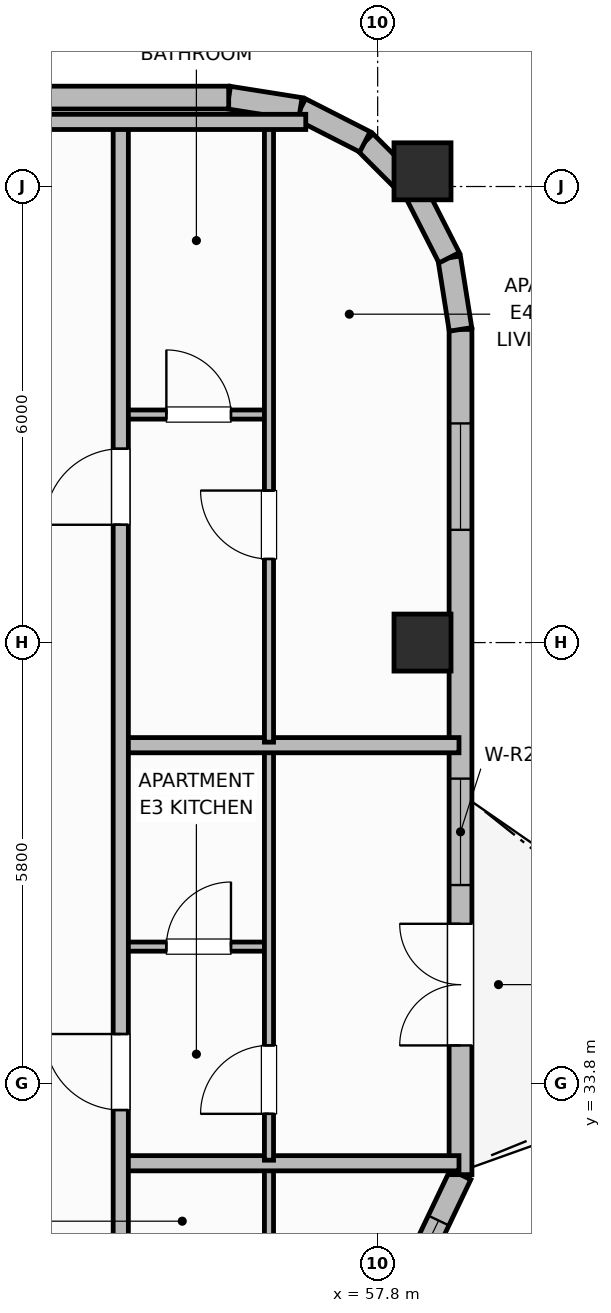
"""IFC4 building model, lengths in metres.
Left out: names, types, materials, properties, quantities, classifications, styles, units other than length and angle.
Written with IfcOpenShell. Run it as: python <this file> out.ifc"""

import sys

from ifc_helpers import new_model, si_unit, direction, frame, frame_2d, origin, origin_2d, place, context, subcontext, project, spatial, rectangle, extrude, element, fill, save


model = new_model("IFC4")
c1 = context("Model", 3, precision=1e-05, world=origin(), true_north=direction((0.0, 1.0)))
c2 = subcontext(c1, "Body", "Model", "MODEL_VIEW")
j1 = project(units=[si_unit("LENGTHUNIT", "METRE"), si_unit("PLANEANGLEUNIT", "RADIAN")], contexts=[c1])
p1 = place(None, origin())
s1 = spatial("IfcSite", under=j1, at=p1, CompositionType="ELEMENT")
p2 = place(p1, origin())
s2 = spatial("IfcBuilding", under=s1, at=p2, CompositionType="ELEMENT")
p3 = place(p2, frame((0.0, 0.0, 278.7)))
s3 = spatial("IfcBuildingStorey", under=s2, at=p3, CompositionType="ELEMENT", Elevation=278.7)
for number, where, z_axis, x_axis in (
    (1, (58.39, 39.6, 0.0), (0.0, 0.0, 1.0), (1.0, 0.0, 0.0)),
    (2, (58.39, 45.8, 0.0), (0.0, 0.0, 1.0), (1.0, 0.0, 0.0)),
):
    element("IfcColumn", number, at=place(p3, frame(where, z_axis=z_axis, x_axis=x_axis)), inside=s3, PredefinedType="COLUMN", context=c2, shape_type="SweptSolid", body=[
        extrude(rectangle(XDim=0.75, YDim=0.75, at=origin_2d()), origin(), (0.0, 0.0, 1.0), 3.7),
    ])
p4 = place(p3, frame((57.84, 30.4, 0.0), z_axis=(0.0, 0.0, 1.0), x_axis=(0.430633186234, 0.902527040544, 0.0)))
e3 = element("IfcWall", 3, at=p4, inside=s3, PredefinedType="SOLIDWALL", context=c2, shape_type="SweptSolid", body=[
    extrude(rectangle(XDim=2.438, YDim=0.3, at=frame_2d((1.219, 0.0))), origin(), (0.0, 0.0, 1.0), 2.73),
])
p5 = place(p4, frame((0.669, 0.0, 0.92)))
e4 = element("IfcOpeningElement", 4, at=p5, cuts=e3, PredefinedType="OPENING", context=c2, shape_type="SweptSolid", body=[
    extrude(rectangle(XDim=1.1, YDim=1.65, at=frame_2d((0.55, 0.825))), frame((0.0, 0.16, 0.0), z_axis=(0.0, -1.0, 0.0), x_axis=(1.0, 0.0, 0.0)), (0.0, 0.0, 1.0), 0.32),
])
p6 = place(p3, frame((58.89, 32.6, 0.0), z_axis=(0.0, 0.0, 1.0), x_axis=(0.0, 1.0, 0.0)))
e5 = element("IfcWall", 5, at=p6, inside=s3, PredefinedType="SOLIDWALL", context=c2, shape_type="SweptSolid", body=[
    extrude(rectangle(XDim=11.12, YDim=0.3, at=frame_2d((5.56, 0.0))), origin(), (0.0, 0.0, 1.0), 2.73),
])
p7 = place(p6, frame((1.7, 0.0, 0.0)))
e6 = element("IfcOpeningElement", 6, at=p7, cuts=e5, PredefinedType="OPENING", context=c2, shape_type="SweptSolid", body=[
    extrude(rectangle(XDim=1.6, YDim=2.1, at=frame_2d((0.8, 1.05))), frame((0.0, 0.16, 0.0), z_axis=(0.0, -1.0, 0.0), x_axis=(1.0, 0.0, 0.0)), (0.0, 0.0, 1.0), 0.32),
])
p8 = place(p6, frame((3.81, 0.0, 0.76)))
e7 = element("IfcOpeningElement", 7, at=p8, cuts=e5, PredefinedType="OPENING", context=c2, shape_type="SweptSolid", body=[
    extrude(rectangle(XDim=1.4, YDim=1.85, at=frame_2d((0.7, 0.925))), frame((0.0, 0.16, 0.0), z_axis=(0.0, -1.0, 0.0), x_axis=(1.0, 0.0, 0.0)), (0.0, 0.0, 1.0), 0.32),
])
p9 = place(p6, frame((8.483, 0.0, 0.76)))
e8 = element("IfcOpeningElement", 8, at=p9, cuts=e5, PredefinedType="OPENING", context=c2, shape_type="SweptSolid", body=[
    extrude(rectangle(XDim=1.4, YDim=1.85, at=frame_2d((0.7, 0.925))), frame((0.0, 0.16, 0.0), z_axis=(0.0, -1.0, 0.0), x_axis=(1.0, 0.0, 0.0)), (0.0, 0.0, 1.0), 0.32),
])
p10 = place(p3, frame((58.89, 43.72, 0.0), z_axis=(0.0, 0.0, 1.0), x_axis=(-0.156304114255, 0.987708977314, 0.0)))
e9 = element("IfcWall", 9, at=p10, inside=s3, PredefinedType="SOLIDWALL", context=c2, shape_type="SweptSolid", body=[
    extrude(rectangle(XDim=0.954, YDim=0.3, at=frame_2d((0.477, 0.0))), origin(), (0.0, 0.0, 1.0), 2.73),
])
p11 = place(p3, frame((58.741, 44.663, 0.0), z_axis=(0.0, 0.0, 1.0), x_axis=(-0.45395644796, 0.891023873617, 0.0)))
e10 = element("IfcWall", 10, at=p11, inside=s3, PredefinedType="SOLIDWALL", context=c2, shape_type="SweptSolid", body=[
    extrude(rectangle(XDim=0.954, YDim=0.3, at=frame_2d((0.477, 0.0))), origin(), (0.0, 0.0, 1.0), 2.73),
])
for number, where, z_axis, x_axis in (
    (11, (58.308, 45.513, 0.0), (0.0, 0.0, 1.0), (-0.707, 0.707, 0.0)),
    (12, (57.633, 46.188, 0.0), (0.0, 0.0, 1.0), (-0.891, 0.454, 0.0)),
):
    element("IfcWall", number, at=place(p3, frame(where, z_axis=z_axis, x_axis=x_axis)), inside=s3, PredefinedType="SOLIDWALL", context=c2, shape_type="SweptSolid", body=[
        extrude(rectangle(XDim=0.954, YDim=0.3, at=frame_2d((0.477, 0.0))), origin(), (0.0, 0.0, 1.0), 2.73),
    ])
p12 = place(p3, frame((56.782, 46.621, 0.0), z_axis=(0.0, 0.0, 1.0), x_axis=(-0.987663181641, 0.156593229835, 0.0)))
e13 = element("IfcWall", 13, at=p12, inside=s3, PredefinedType="SOLIDWALL", context=c2, shape_type="SweptSolid", body=[
    extrude(rectangle(XDim=0.954, YDim=0.3, at=frame_2d((0.477, 0.0))), origin(), (0.0, 0.0, 1.0), 2.73),
])
p13 = place(p3, frame((55.84, 46.77, 0.0), z_axis=(0.0, 0.0, 1.0), x_axis=(-1.0, 0.0, 0.0)))
e14 = element("IfcWall", 14, at=p13, inside=s3, PredefinedType="SOLIDWALL", context=c2, shape_type="SweptSolid", body=[
    extrude(rectangle(XDim=33.28, YDim=0.3, at=frame_2d((16.64, 0.0))), origin(), (0.0, 0.0, 1.0), 2.73),
])
p14 = place(p13, frame((4.461, 0.0, 0.95)))
e15 = element("IfcOpeningElement", 15, at=p14, cuts=e14, PredefinedType="OPENING", context=c2, shape_type="SweptSolid", body=[
    extrude(rectangle(XDim=1.1, YDim=1.65, at=frame_2d((0.55, 0.825))), frame((0.0, 0.16, 0.0), z_axis=(0.0, -1.0, 0.0), x_axis=(1.0, 0.0, 0.0)), (0.0, 0.0, 1.0), 0.32),
])
p15 = place(p13, frame((7.368, 0.0, 0.95)))
e16 = element("IfcOpeningElement", 16, at=p15, cuts=e14, PredefinedType="OPENING", context=c2, shape_type="SweptSolid", body=[
    extrude(rectangle(XDim=1.1, YDim=1.65, at=frame_2d((0.55, 0.825))), frame((0.0, 0.16, 0.0), z_axis=(0.0, -1.0, 0.0), x_axis=(1.0, 0.0, 0.0)), (0.0, 0.0, 1.0), 0.32),
])
p16 = place(p13, frame((10.275, 0.0, 0.95)))
e17 = element("IfcOpeningElement", 17, at=p16, cuts=e14, PredefinedType="OPENING", context=c2, shape_type="SweptSolid", body=[
    extrude(rectangle(XDim=1.1, YDim=1.65, at=frame_2d((0.55, 0.825))), frame((0.0, 0.16, 0.0), z_axis=(0.0, -1.0, 0.0), x_axis=(1.0, 0.0, 0.0)), (0.0, 0.0, 1.0), 0.32),
])
p17 = place(p13, frame((13.883, 0.0, 0.95)))
e18 = element("IfcOpeningElement", 18, at=p17, cuts=e14, PredefinedType="OPENING", context=c2, shape_type="SweptSolid", body=[
    extrude(rectangle(XDim=1.1, YDim=1.65, at=frame_2d((0.55, 0.825))), frame((0.0, 0.16, 0.0), z_axis=(0.0, -1.0, 0.0), x_axis=(1.0, 0.0, 0.0)), (0.0, 0.0, 1.0), 0.32),
])
p18 = place(p13, frame((16.09, 0.0, 0.95)))
e19 = element("IfcOpeningElement", 19, at=p18, cuts=e14, PredefinedType="OPENING", context=c2, shape_type="SweptSolid", body=[
    extrude(rectangle(XDim=1.1, YDim=1.65, at=frame_2d((0.55, 0.825))), frame((0.0, 0.16, 0.0), z_axis=(0.0, -1.0, 0.0), x_axis=(1.0, 0.0, 0.0)), (0.0, 0.0, 1.0), 0.32),
])
p19 = place(p13, frame((18.297, 0.0, 0.95)))
e20 = element("IfcOpeningElement", 20, at=p19, cuts=e14, PredefinedType="OPENING", context=c2, shape_type="SweptSolid", body=[
    extrude(rectangle(XDim=1.1, YDim=1.65, at=frame_2d((0.55, 0.825))), frame((0.0, 0.16, 0.0), z_axis=(0.0, -1.0, 0.0), x_axis=(1.0, 0.0, 0.0)), (0.0, 0.0, 1.0), 0.32),
])
p20 = place(p13, frame((21.905, 0.0, 0.95)))
e21 = element("IfcOpeningElement", 21, at=p20, cuts=e14, PredefinedType="OPENING", context=c2, shape_type="SweptSolid", body=[
    extrude(rectangle(XDim=1.1, YDim=1.65, at=frame_2d((0.55, 0.825))), frame((0.0, 0.16, 0.0), z_axis=(0.0, -1.0, 0.0), x_axis=(1.0, 0.0, 0.0)), (0.0, 0.0, 1.0), 0.32),
])
p21 = place(p13, frame((24.812, 0.0, 0.95)))
e22 = element("IfcOpeningElement", 22, at=p21, cuts=e14, PredefinedType="OPENING", context=c2, shape_type="SweptSolid", body=[
    extrude(rectangle(XDim=1.1, YDim=1.65, at=frame_2d((0.55, 0.825))), frame((0.0, 0.16, 0.0), z_axis=(0.0, -1.0, 0.0), x_axis=(1.0, 0.0, 0.0)), (0.0, 0.0, 1.0), 0.32),
])
p22 = place(p13, frame((27.719, 0.0, 0.95)))
e23 = element("IfcOpeningElement", 23, at=p22, cuts=e14, PredefinedType="OPENING", context=c2, shape_type="SweptSolid", body=[
    extrude(rectangle(XDim=1.1, YDim=1.65, at=frame_2d((0.55, 0.825))), frame((0.0, 0.16, 0.0), z_axis=(0.0, -1.0, 0.0), x_axis=(1.0, 0.0, 0.0)), (0.0, 0.0, 1.0), 0.32),
])
p23 = place(p3, frame((56.37, 19.48, 0.0), z_axis=(0.0, 0.0, 1.0), x_axis=(0.0, 1.0, 0.0)))
e24 = element("IfcWall", 24, at=p23, inside=s3, PredefinedType="PARTITIONING", context=c2, shape_type="SweptSolid", body=[
    extrude(rectangle(XDim=13.23, YDim=0.12, at=frame_2d((6.615, 0.0))), origin(), (0.0, 0.0, 1.0), 2.56),
])
p24 = place(p23, frame((0.61, 0.0, 0.0)))
e25 = element("IfcOpeningElement", 25, at=p24, cuts=e24, PredefinedType="OPENING", context=c2, shape_type="SweptSolid", body=[
    extrude(rectangle(XDim=0.9, YDim=2.1, at=frame_2d((0.45, 1.05))), frame((0.0, 0.07, 0.0), z_axis=(0.0, -1.0, 0.0), x_axis=(1.0, 0.0, 0.0)), (0.0, 0.0, 1.0), 0.14),
])
p25 = place(p23, frame((10.79, 0.0, 0.0)))
e26 = element("IfcOpeningElement", 26, at=p25, cuts=e24, PredefinedType="OPENING", context=c2, shape_type="SweptSolid", body=[
    extrude(rectangle(XDim=0.82, YDim=2.08, at=frame_2d((0.41, 1.04))), frame((0.0, 0.07, 0.0), z_axis=(0.0, -1.0, 0.0), x_axis=(1.0, 0.0, 0.0)), (0.0, 0.0, 1.0), 0.14),
])
p26 = place(p3, frame((54.42, 32.75, 0.0), z_axis=(0.0, 0.0, 1.0), x_axis=(1.0, 0.0, 0.0)))
e27 = element("IfcWall", 27, at=p26, inside=s3, PredefinedType="PARTITIONING", context=c2, shape_type="SweptSolid", body=[
    extrude(rectangle(XDim=4.45, YDim=0.2, at=frame_2d((2.225, 0.0))), origin(), (0.0, 0.0, 1.0), 2.56),
])
p27 = place(p3, frame((54.42, 35.6, 0.0), z_axis=(0.0, 0.0, 1.0), x_axis=(1.0, 0.0, 0.0)))
e28 = element("IfcWall", 28, at=p27, inside=s3, PredefinedType="PARTITIONING", context=c2, shape_type="SweptSolid", body=[
    extrude(rectangle(XDim=1.95, YDim=0.12, at=frame_2d((0.975, 0.0))), origin(), (0.0, 0.0, 1.0), 2.56),
])
p28 = place(p27, frame((0.6, 0.0, 0.0)))
e29 = element("IfcOpeningElement", 29, at=p28, cuts=e28, PredefinedType="OPENING", context=c2, shape_type="SweptSolid", body=[
    extrude(rectangle(XDim=0.85, YDim=2.1, at=frame_2d((0.425, 1.05))), frame((0.0, 0.07, 0.0), z_axis=(0.0, -1.0, 0.0), x_axis=(1.0, 0.0, 0.0)), (0.0, 0.0, 1.0), 0.14),
])
p29 = place(p3, frame((56.37, 32.79, 0.0), z_axis=(0.0, 0.0, 1.0), x_axis=(0.0, 1.0, 0.0)))
e30 = element("IfcWall", 30, at=p29, inside=s3, PredefinedType="PARTITIONING", context=c2, shape_type="SweptSolid", body=[
    extrude(rectangle(XDim=5.42, YDim=0.12, at=frame_2d((2.71, 0.0))), origin(), (0.0, 0.0, 1.0), 2.56),
])
p30 = place(p29, frame((0.61, 0.0, 0.0)))
e31 = element("IfcOpeningElement", 31, at=p30, cuts=e30, PredefinedType="OPENING", context=c2, shape_type="SweptSolid", body=[
    extrude(rectangle(XDim=0.9, YDim=2.1, at=frame_2d((0.45, 1.05))), frame((0.0, 0.07, 0.0), z_axis=(0.0, -1.0, 0.0), x_axis=(1.0, 0.0, 0.0)), (0.0, 0.0, 1.0), 0.14),
])
p31 = place(p3, frame((54.42, 38.25, 0.0), z_axis=(0.0, 0.0, 1.0), x_axis=(1.0, 0.0, 0.0)))
e32 = element("IfcWall", 32, at=p31, inside=s3, PredefinedType="PARTITIONING", context=c2, shape_type="SweptSolid", body=[
    extrude(rectangle(XDim=4.45, YDim=0.2, at=frame_2d((2.225, 0.0))), origin(), (0.0, 0.0, 1.0), 2.56),
])
p32 = place(p3, frame((54.42, 42.6, 0.0), z_axis=(0.0, 0.0, 1.0), x_axis=(1.0, 0.0, 0.0)))
e33 = element("IfcWall", 33, at=p32, inside=s3, PredefinedType="PARTITIONING", context=c2, shape_type="SweptSolid", body=[
    extrude(rectangle(XDim=1.95, YDim=0.12, at=frame_2d((0.975, 0.0))), origin(), (0.0, 0.0, 1.0), 2.56),
])
p33 = place(p32, frame((0.6, 0.0, 0.0)))
e34 = element("IfcOpeningElement", 34, at=p33, cuts=e33, PredefinedType="OPENING", context=c2, shape_type="SweptSolid", body=[
    extrude(rectangle(XDim=0.85, YDim=2.1, at=frame_2d((0.425, 1.05))), frame((0.0, 0.07, 0.0), z_axis=(0.0, -1.0, 0.0), x_axis=(1.0, 0.0, 0.0)), (0.0, 0.0, 1.0), 0.14),
])
p34 = place(p3, frame((56.37, 38.29, 0.0), z_axis=(0.0, 0.0, 1.0), x_axis=(0.0, 1.0, 0.0)))
e35 = element("IfcWall", 35, at=p34, inside=s3, PredefinedType="PARTITIONING", context=c2, shape_type="SweptSolid", body=[
    extrude(rectangle(XDim=8.12, YDim=0.12, at=frame_2d((4.06, 0.0))), origin(), (0.0, 0.0, 1.0), 2.56),
])
p35 = place(p34, frame((2.41, 0.0, 0.0)))
e36 = element("IfcOpeningElement", 36, at=p35, cuts=e35, PredefinedType="OPENING", context=c2, shape_type="SweptSolid", body=[
    extrude(rectangle(XDim=0.9, YDim=2.1, at=frame_2d((0.45, 1.05))), frame((0.0, 0.07, 0.0), z_axis=(0.0, -1.0, 0.0), x_axis=(1.0, 0.0, 0.0)), (0.0, 0.0, 1.0), 0.14),
])
p36 = place(p3, frame((54.42, 9.95, 0.0), z_axis=(0.0, 0.0, 1.0), x_axis=(0.0, 1.0, 0.0)))
e37 = element("IfcWall", 37, at=p36, inside=s3, PredefinedType="PARTITIONING", context=c2, shape_type="SweptSolid", body=[
    extrude(rectangle(XDim=36.5, YDim=0.2, at=frame_2d((18.25, 0.0))), origin(), (0.0, 0.0, 1.0), 2.56),
])
p37 = place(p36, frame((3.11, 0.0, 0.0)))
e38 = element("IfcOpeningElement", 38, at=p37, cuts=e37, PredefinedType="OPENING", context=c2, shape_type="SweptSolid", body=[
    extrude(rectangle(XDim=1.0, YDim=2.15, at=frame_2d((0.5, 1.075))), frame((0.0, 0.11, 0.0), z_axis=(0.0, -1.0, 0.0), x_axis=(1.0, 0.0, 0.0)), (0.0, 0.0, 1.0), 0.22),
])
p38 = place(p36, frame((11.99, 0.0, 0.0)))
e39 = element("IfcOpeningElement", 39, at=p38, cuts=e37, PredefinedType="OPENING", context=c2, shape_type="SweptSolid", body=[
    extrude(rectangle(XDim=1.0, YDim=2.15, at=frame_2d((0.5, 1.075))), frame((0.0, 0.11, 0.0), z_axis=(0.0, -1.0, 0.0), x_axis=(1.0, 0.0, 0.0)), (0.0, 0.0, 1.0), 0.22),
])
p39 = place(p36, frame((23.5, 0.0, 0.0)))
e40 = element("IfcOpeningElement", 40, at=p39, cuts=e37, PredefinedType="OPENING", context=c2, shape_type="SweptSolid", body=[
    extrude(rectangle(XDim=1.0, YDim=2.15, at=frame_2d((0.5, 1.075))), frame((0.0, 0.11, 0.0), z_axis=(0.0, -1.0, 0.0), x_axis=(1.0, 0.0, 0.0)), (0.0, 0.0, 1.0), 0.22),
])
p40 = place(p36, frame((31.2, 0.0, 0.0)))
e41 = element("IfcOpeningElement", 41, at=p40, cuts=e37, PredefinedType="OPENING", context=c2, shape_type="SweptSolid", body=[
    extrude(rectangle(XDim=1.0, YDim=2.15, at=frame_2d((0.5, 1.075))), frame((0.0, 0.11, 0.0), z_axis=(0.0, -1.0, 0.0), x_axis=(1.0, 0.0, 0.0)), (0.0, 0.0, 1.0), 0.22),
])
p41 = place(p3, frame((53.1, 46.45, 0.0), z_axis=(0.0, 0.0, 1.0), x_axis=(1.0, 0.0, 0.0)))
e42 = element("IfcWall", 42, at=p41, inside=s3, PredefinedType="PARTITIONING", context=c2, shape_type="SweptSolid", body=[
    extrude(rectangle(XDim=3.754, YDim=0.2, at=frame_2d((1.877, 0.0))), origin(), (0.0, 0.0, 1.0), 2.56),
])
p42 = place(p5, origin())
e43 = element("IfcWindow", 43, at=p42, inside=s3, PartitioningType="SINGLE_PANEL", PredefinedType="WINDOW", context=c2, shape_type="SweptSolid", body=[
    extrude(rectangle(XDim=1.1, YDim=1.65, at=frame_2d((0.55, 0.825))), frame((0.0, 0.03, 0.0), z_axis=(0.0, -1.0, 0.0), x_axis=(1.0, 0.0, 0.0)), (0.0, 0.0, 1.0), 0.06),
])
fill(e4, e43)
p43 = place(p7, origin())
e44 = element("IfcDoor", 44, at=p43, inside=s3, OperationType="DOUBLE_DOOR_SINGLE_SWING", PredefinedType="DOOR", context=c2, shape_type="SweptSolid", body=[
    extrude(rectangle(XDim=1.6, YDim=2.1, at=frame_2d((0.8, 1.05))), frame((0.0, 0.025, 0.0), z_axis=(0.0, -1.0, 0.0), x_axis=(1.0, 0.0, 0.0)), (0.0, 0.0, 1.0), 0.05),
])
fill(e6, e44)
p44 = place(p8, origin())
e45 = element("IfcWindow", 45, at=p44, inside=s3, PartitioningType="SINGLE_PANEL", PredefinedType="WINDOW", context=c2, shape_type="SweptSolid", body=[
    extrude(rectangle(XDim=1.4, YDim=1.85, at=frame_2d((0.7, 0.925))), frame((0.0, 0.03, 0.0), z_axis=(0.0, -1.0, 0.0), x_axis=(1.0, 0.0, 0.0)), (0.0, 0.0, 1.0), 0.06),
])
fill(e7, e45)
p45 = place(p9, origin())
e46 = element("IfcWindow", 46, at=p45, inside=s3, PartitioningType="SINGLE_PANEL", PredefinedType="WINDOW", context=c2, shape_type="SweptSolid", body=[
    extrude(rectangle(XDim=1.4, YDim=1.85, at=frame_2d((0.7, 0.925))), frame((0.0, 0.03, 0.0), z_axis=(0.0, -1.0, 0.0), x_axis=(1.0, 0.0, 0.0)), (0.0, 0.0, 1.0), 0.06),
])
fill(e8, e46)
p46 = place(p28, origin())
e47 = element("IfcDoor", 47, at=p46, inside=s3, OperationType="SINGLE_SWING_RIGHT", PredefinedType="DOOR", context=c2, shape_type="SweptSolid", body=[
    extrude(rectangle(XDim=0.85, YDim=2.1, at=frame_2d((0.425, 1.05))), frame((0.0, 0.025, 0.0), z_axis=(0.0, -1.0, 0.0), x_axis=(1.0, 0.0, 0.0)), (0.0, 0.0, 1.0), 0.05),
])
fill(e29, e47)
p47 = place(p30, origin())
e48 = element("IfcDoor", 48, at=p47, inside=s3, OperationType="SINGLE_SWING_LEFT", PredefinedType="DOOR", context=c2, shape_type="SweptSolid", body=[
    extrude(rectangle(XDim=0.9, YDim=2.1, at=frame_2d((0.45, 1.05))), frame((0.0, 0.025, 0.0), z_axis=(0.0, -1.0, 0.0), x_axis=(1.0, 0.0, 0.0)), (0.0, 0.0, 1.0), 0.05),
])
fill(e31, e48)
p48 = place(p33, origin())
e49 = element("IfcDoor", 49, at=p48, inside=s3, OperationType="SINGLE_SWING_LEFT", PredefinedType="DOOR", context=c2, shape_type="SweptSolid", body=[
    extrude(rectangle(XDim=0.85, YDim=2.1, at=frame_2d((0.425, 1.05))), frame((0.0, 0.025, 0.0), z_axis=(0.0, -1.0, 0.0), x_axis=(1.0, 0.0, 0.0)), (0.0, 0.0, 1.0), 0.05),
])
fill(e34, e49)
p49 = place(p35, origin())
e50 = element("IfcDoor", 50, at=p49, inside=s3, OperationType="SINGLE_SWING_RIGHT", PredefinedType="DOOR", context=c2, shape_type="SweptSolid", body=[
    extrude(rectangle(XDim=0.9, YDim=2.1, at=frame_2d((0.45, 1.05))), frame((0.0, 0.025, 0.0), z_axis=(0.0, -1.0, 0.0), x_axis=(1.0, 0.0, 0.0)), (0.0, 0.0, 1.0), 0.05),
])
fill(e36, e50)
p50 = place(p39, origin())
e51 = element("IfcDoor", 51, at=p50, inside=s3, OperationType="SINGLE_SWING_RIGHT", PredefinedType="DOOR", context=c2, shape_type="SweptSolid", body=[
    extrude(rectangle(XDim=1.0, YDim=2.15, at=frame_2d((0.5, 1.075))), frame((0.0, 0.025, 0.0), z_axis=(0.0, -1.0, 0.0), x_axis=(1.0, 0.0, 0.0)), (0.0, 0.0, 1.0), 0.05),
])
fill(e40, e51)
p51 = place(p40, origin())
e52 = element("IfcDoor", 52, at=p51, inside=s3, OperationType="SINGLE_SWING_LEFT", PredefinedType="DOOR", context=c2, shape_type="SweptSolid", body=[
    extrude(rectangle(XDim=1.0, YDim=2.15, at=frame_2d((0.5, 1.075))), frame((0.0, 0.025, 0.0), z_axis=(0.0, -1.0, 0.0), x_axis=(1.0, 0.0, 0.0)), (0.0, 0.0, 1.0), 0.05),
])
fill(e41, e52)
save(model, sys.argv[1])
